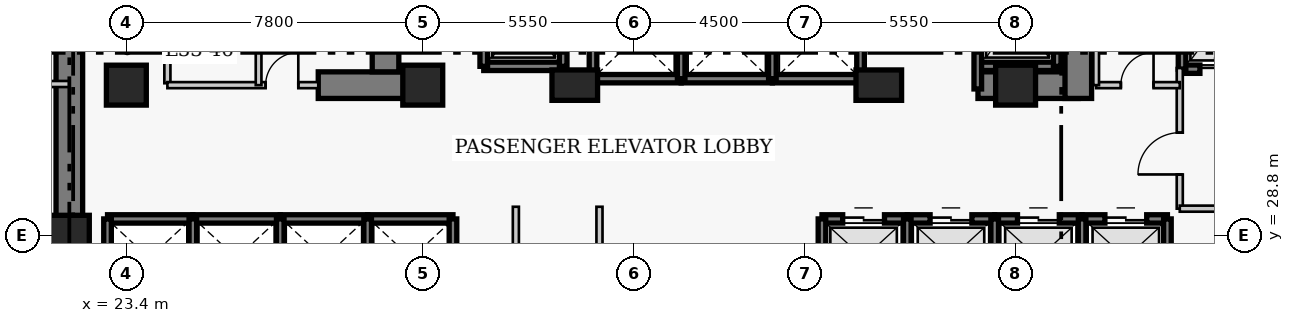
"""IFC4 building model, lengths in metres.
Left out: names, types, materials, properties, quantities, classifications, styles, units other than length and angle.
Written with IfcOpenShell. Run it as: python <this file> out.ifc"""

import sys

from ifc_helpers import new_model, si_unit, direction, frame, frame_2d, origin, origin_2d, place, context, subcontext, project, spatial, rectangle, extrude, element, fill, save


model = new_model("IFC4")
c1 = context("Model", 3, precision=1e-05, world=origin(), true_north=direction((0.0, 1.0)))
c2 = subcontext(c1, "Body", "Model", "MODEL_VIEW")
j1 = project(units=[si_unit("LENGTHUNIT", "METRE"), si_unit("PLANEANGLEUNIT", "RADIAN")], contexts=[c1])
p1 = place(None, origin())
s1 = spatial("IfcSite", under=j1, at=p1, CompositionType="ELEMENT")
p2 = place(p1, origin())
s2 = spatial("IfcBuilding", under=s1, at=p2, CompositionType="ELEMENT")
p3 = place(p2, frame((0.0, 0.0, 134.6)))
s3 = spatial("IfcBuildingStorey", under=s2, at=p3, CompositionType="ELEMENT", Elevation=134.6)
p4 = place(p3, frame((21.9, 27.05, 0.0), z_axis=(0.0, 0.0, 1.0), x_axis=(0.0, 1.0, 0.0)))
e1 = element("IfcWall", 1, at=p4, inside=s3, PredefinedType="SHEAR", context=c2, shape_type="SweptSolid", body=[
    extrude(rectangle(XDim=13.62, YDim=0.7, at=frame_2d((6.81, 0.0))), origin(), (0.0, 0.0, 1.0), 3.8),
])
p5 = place(p3, frame((28.45, 32.75, 0.0), z_axis=(0.0, 0.0, 1.0), x_axis=(1.0, 0.0, 0.0)))
e2 = element("IfcWall", 2, at=p5, inside=s3, PredefinedType="SHEAR", context=c2, shape_type="SweptSolid", body=[
    extrude(rectangle(XDim=2.4, YDim=0.7, at=frame_2d((1.2, 0.0))), origin(), (0.0, 0.0, 1.0), 3.8),
])
p6 = place(p3, frame((45.81, 32.75, 0.0), z_axis=(0.0, 0.0, 1.0), x_axis=(1.0, 0.0, 0.0)))
e3 = element("IfcWall", 3, at=p6, inside=s3, PredefinedType="SHEAR", context=c2, shape_type="SweptSolid", body=[
    extrude(rectangle(XDim=2.64, YDim=0.7, at=frame_2d((1.32, 0.0))), origin(), (0.0, 0.0, 1.0), 3.8),
])
p7 = place(p3, frame((30.22, 33.1, 0.0), z_axis=(0.0, 0.0, 1.0), x_axis=(0.0, 1.0, 0.0)))
e4 = element("IfcWall", 4, at=p7, inside=s3, PredefinedType="SHEAR", context=c2, shape_type="SweptSolid", body=[
    extrude(rectangle(XDim=7.22, YDim=0.7, at=frame_2d((3.61, 0.0))), origin(), (0.0, 0.0, 1.0), 3.8),
])
p8 = place(p3, frame((48.45, 32.4, 0.0), z_axis=(0.0, 0.0, 1.0), x_axis=(0.0, 1.0, 0.0)))
e5 = element("IfcWall", 5, at=p8, inside=s3, PredefinedType="SHEAR", context=c2, shape_type="SweptSolid", body=[
    extrude(rectangle(XDim=7.92, YDim=0.7, at=frame_2d((3.96, 0.0))), origin(), (0.0, 0.0, 1.0), 3.8),
])
p9 = place(p8, frame((5.8, 0.0, 0.0)))
e6 = element("IfcOpeningElement", 6, at=p9, cuts=e5, PredefinedType="OPENING", context=c2, shape_type="SweptSolid", body=[
    extrude(rectangle(XDim=1.1, YDim=2.15, at=frame_2d((0.55, 1.075))), frame((0.0, 0.36, 0.0), z_axis=(0.0, -1.0, 0.0), x_axis=(1.0, 0.0, 0.0)), (0.0, 0.0, 1.0), 0.72),
])
for number, where, z_axis, x_axis in (
    (7, (21.9, 28.8, 0.0), (0.0, 0.0, 1.0), (1.0, 0.0, 0.0)),
    (8, (23.4, 32.75, 0.0), (0.0, 0.0, 1.0), (1.0, 0.0, 0.0)),
    (9, (31.2, 32.75, 0.0), (0.0, 0.0, 1.0), (1.0, 0.0, 0.0)),
):
    element("IfcColumn", number, at=place(p3, frame(where, z_axis=z_axis, x_axis=x_axis)), inside=s3, PredefinedType="COLUMN", context=c2, shape_type="SweptSolid", body=[
        extrude(rectangle(XDim=1.05, YDim=1.05, at=origin_2d()), origin(), (0.0, 0.0, 1.0), 3.8),
    ])
for number, where, z_axis, x_axis in (
    (10, (35.2, 32.75, 0.0), (0.0, 0.0, 1.0), (1.0, 0.0, 0.0)),
    (11, (43.2, 32.75, 0.0), (0.0, 0.0, 1.0), (1.0, 0.0, 0.0)),
):
    element("IfcColumn", number, at=place(p3, frame(where, z_axis=z_axis, x_axis=x_axis)), inside=s3, PredefinedType="COLUMN", context=c2, shape_type="SweptSolid", body=[
        extrude(rectangle(XDim=1.2, YDim=0.8, at=origin_2d()), origin(), (0.0, 0.0, 1.0), 3.8),
    ])
p10 = place(p3, frame((46.8, 32.75, 0.0), z_axis=(0.0, 0.0, 1.0), x_axis=(1.0, 0.0, 0.0)))
e12 = element("IfcColumn", 12, at=p10, inside=s3, PredefinedType="COLUMN", context=c2, shape_type="SweptSolid", body=[
    extrude(rectangle(XDim=1.05, YDim=1.05, at=origin_2d()), origin(), (0.0, 0.0, 1.0), 3.8),
])
p11 = place(p3, frame((22.905, 29.23, 0.0), z_axis=(0.0, 0.0, 1.0), x_axis=(1.0, 0.0, 0.0)))
e13 = element("IfcWall", 13, at=p11, inside=s3, PredefinedType="SHEAR", context=c2, shape_type="SweptSolid", body=[
    extrude(rectangle(XDim=2.245, YDim=0.22, at=frame_2d((1.123, 0.0))), origin(), (0.0, 0.0, 1.0), 3.8),
])
p12 = place(p3, frame((22.905, 27.17, 0.0), z_axis=(0.0, 0.0, 1.0), x_axis=(0.0, 1.0, 0.0)))
e14 = element("IfcWall", 14, at=p12, inside=s3, PredefinedType="SHEAR", context=c2, shape_type="SweptSolid", body=[
    extrude(rectangle(XDim=2.06, YDim=0.2, at=frame_2d((1.03, 0.0))), origin(), (0.0, 0.0, 1.0), 3.8),
])
p13 = place(p3, frame((25.15, 29.23, 0.0), z_axis=(0.0, 0.0, 1.0), x_axis=(1.0, 0.0, 0.0)))
e15 = element("IfcWall", 15, at=p13, inside=s3, PredefinedType="SHEAR", context=c2, shape_type="SweptSolid", body=[
    extrude(rectangle(XDim=2.3, YDim=0.22, at=frame_2d((1.15, 0.0))), origin(), (0.0, 0.0, 1.0), 3.8),
])
p14 = place(p3, frame((25.15, 27.17, 0.0), z_axis=(0.0, 0.0, 1.0), x_axis=(0.0, 1.0, 0.0)))
e16 = element("IfcWall", 16, at=p14, inside=s3, PredefinedType="SHEAR", context=c2, shape_type="SweptSolid", body=[
    extrude(rectangle(XDim=2.06, YDim=0.2, at=frame_2d((1.03, 0.0))), origin(), (0.0, 0.0, 1.0), 3.8),
])
p15 = place(p3, frame((27.45, 29.23, 0.0), z_axis=(0.0, 0.0, 1.0), x_axis=(1.0, 0.0, 0.0)))
e17 = element("IfcWall", 17, at=p15, inside=s3, PredefinedType="SHEAR", context=c2, shape_type="SweptSolid", body=[
    extrude(rectangle(XDim=2.3, YDim=0.22, at=frame_2d((1.15, 0.0))), origin(), (0.0, 0.0, 1.0), 3.8),
])
p16 = place(p3, frame((27.45, 27.17, 0.0), z_axis=(0.0, 0.0, 1.0), x_axis=(0.0, 1.0, 0.0)))
e18 = element("IfcWall", 18, at=p16, inside=s3, PredefinedType="SHEAR", context=c2, shape_type="SweptSolid", body=[
    extrude(rectangle(XDim=2.06, YDim=0.2, at=frame_2d((1.03, 0.0))), origin(), (0.0, 0.0, 1.0), 3.8),
])
p17 = place(p3, frame((29.75, 29.23, 0.0), z_axis=(0.0, 0.0, 1.0), x_axis=(1.0, 0.0, 0.0)))
e19 = element("IfcWall", 19, at=p17, inside=s3, PredefinedType="SHEAR", context=c2, shape_type="SweptSolid", body=[
    extrude(rectangle(XDim=2.245, YDim=0.22, at=frame_2d((1.123, 0.0))), origin(), (0.0, 0.0, 1.0), 3.8),
])
for number, where, z_axis, x_axis in (
    (20, (29.75, 27.17, 0.0), (0.0, 0.0, 1.0), (0.0, 1.0, 0.0)),
    (21, (31.995, 27.17, 0.0), (0.0, 0.0, 1.0), (0.0, 1.0, 0.0)),
):
    element("IfcWall", number, at=place(p3, frame(where, z_axis=z_axis, x_axis=x_axis)), inside=s3, PredefinedType="SHEAR", context=c2, shape_type="SweptSolid", body=[
        extrude(rectangle(XDim=2.06, YDim=0.2, at=frame_2d((1.03, 0.0))), origin(), (0.0, 0.0, 1.0), 3.8),
    ])
p18 = place(p3, frame((41.705, 29.23, 0.0), z_axis=(0.0, 0.0, 1.0), x_axis=(1.0, 0.0, 0.0)))
e22 = element("IfcWall", 22, at=p18, inside=s3, PredefinedType="SHEAR", context=c2, shape_type="SweptSolid", body=[
    extrude(rectangle(XDim=2.245, YDim=0.22, at=frame_2d((1.123, 0.0))), origin(), (0.0, 0.0, 1.0), 3.8),
])
p19 = place(p18, frame((0.545, 0.0, 0.0)))
e23 = element("IfcOpeningElement", 23, at=p19, cuts=e22, PredefinedType="OPENING", context=c2, shape_type="SweptSolid", body=[
    extrude(rectangle(XDim=1.1, YDim=2.15, at=frame_2d((0.55, 1.075))), frame((0.0, 0.12, 0.0), z_axis=(0.0, -1.0, 0.0), x_axis=(1.0, 0.0, 0.0)), (0.0, 0.0, 1.0), 0.24),
])
p20 = place(p3, frame((41.705, 27.17, 0.0), z_axis=(0.0, 0.0, 1.0), x_axis=(0.0, 1.0, 0.0)))
e24 = element("IfcWall", 24, at=p20, inside=s3, PredefinedType="SHEAR", context=c2, shape_type="SweptSolid", body=[
    extrude(rectangle(XDim=2.06, YDim=0.2, at=frame_2d((1.03, 0.0))), origin(), (0.0, 0.0, 1.0), 3.8),
])
p21 = place(p3, frame((43.95, 29.23, 0.0), z_axis=(0.0, 0.0, 1.0), x_axis=(1.0, 0.0, 0.0)))
e25 = element("IfcWall", 25, at=p21, inside=s3, PredefinedType="SHEAR", context=c2, shape_type="SweptSolid", body=[
    extrude(rectangle(XDim=2.3, YDim=0.22, at=frame_2d((1.15, 0.0))), origin(), (0.0, 0.0, 1.0), 3.8),
])
p22 = place(p21, frame((0.6, 0.0, 0.0)))
e26 = element("IfcOpeningElement", 26, at=p22, cuts=e25, PredefinedType="OPENING", context=c2, shape_type="SweptSolid", body=[
    extrude(rectangle(XDim=1.1, YDim=2.15, at=frame_2d((0.55, 1.075))), frame((0.0, 0.12, 0.0), z_axis=(0.0, -1.0, 0.0), x_axis=(1.0, 0.0, 0.0)), (0.0, 0.0, 1.0), 0.24),
])
p23 = place(p3, frame((43.95, 27.17, 0.0), z_axis=(0.0, 0.0, 1.0), x_axis=(0.0, 1.0, 0.0)))
e27 = element("IfcWall", 27, at=p23, inside=s3, PredefinedType="SHEAR", context=c2, shape_type="SweptSolid", body=[
    extrude(rectangle(XDim=2.06, YDim=0.2, at=frame_2d((1.03, 0.0))), origin(), (0.0, 0.0, 1.0), 3.8),
])
p24 = place(p3, frame((46.25, 29.23, 0.0), z_axis=(0.0, 0.0, 1.0), x_axis=(1.0, 0.0, 0.0)))
e28 = element("IfcWall", 28, at=p24, inside=s3, PredefinedType="SHEAR", context=c2, shape_type="SweptSolid", body=[
    extrude(rectangle(XDim=2.3, YDim=0.22, at=frame_2d((1.15, 0.0))), origin(), (0.0, 0.0, 1.0), 3.8),
])
p25 = place(p24, frame((0.6, 0.0, 0.0)))
e29 = element("IfcOpeningElement", 29, at=p25, cuts=e28, PredefinedType="OPENING", context=c2, shape_type="SweptSolid", body=[
    extrude(rectangle(XDim=1.1, YDim=2.15, at=frame_2d((0.55, 1.075))), frame((0.0, 0.12, 0.0), z_axis=(0.0, -1.0, 0.0), x_axis=(1.0, 0.0, 0.0)), (0.0, 0.0, 1.0), 0.24),
])
p26 = place(p3, frame((46.25, 27.17, 0.0), z_axis=(0.0, 0.0, 1.0), x_axis=(0.0, 1.0, 0.0)))
e30 = element("IfcWall", 30, at=p26, inside=s3, PredefinedType="SHEAR", context=c2, shape_type="SweptSolid", body=[
    extrude(rectangle(XDim=2.06, YDim=0.2, at=frame_2d((1.03, 0.0))), origin(), (0.0, 0.0, 1.0), 3.8),
])
p27 = place(p3, frame((48.55, 29.23, 0.0), z_axis=(0.0, 0.0, 1.0), x_axis=(1.0, 0.0, 0.0)))
e31 = element("IfcWall", 31, at=p27, inside=s3, PredefinedType="SHEAR", context=c2, shape_type="SweptSolid", body=[
    extrude(rectangle(XDim=2.245, YDim=0.22, at=frame_2d((1.123, 0.0))), origin(), (0.0, 0.0, 1.0), 3.8),
])
p28 = place(p27, frame((0.6, 0.0, 0.0)))
e32 = element("IfcOpeningElement", 32, at=p28, cuts=e31, PredefinedType="OPENING", context=c2, shape_type="SweptSolid", body=[
    extrude(rectangle(XDim=1.1, YDim=2.15, at=frame_2d((0.55, 1.075))), frame((0.0, 0.12, 0.0), z_axis=(0.0, -1.0, 0.0), x_axis=(1.0, 0.0, 0.0)), (0.0, 0.0, 1.0), 0.24),
])
for number, where, z_axis, x_axis in (
    (33, (48.55, 27.17, 0.0), (0.0, 0.0, 1.0), (0.0, 1.0, 0.0)),
    (34, (50.795, 27.17, 0.0), (0.0, 0.0, 1.0), (0.0, 1.0, 0.0)),
):
    element("IfcWall", number, at=place(p3, frame(where, z_axis=z_axis, x_axis=x_axis)), inside=s3, PredefinedType="SHEAR", context=c2, shape_type="SweptSolid", body=[
        extrude(rectangle(XDim=2.06, YDim=0.2, at=frame_2d((1.03, 0.0))), origin(), (0.0, 0.0, 1.0), 3.8),
    ])
p29 = place(p3, frame((35.68, 32.92, 0.0), z_axis=(0.0, 0.0, 1.0), x_axis=(1.0, 0.0, 0.0)))
e35 = element("IfcWall", 35, at=p29, inside=s3, PredefinedType="SHEAR", context=c2, shape_type="SweptSolid", body=[
    extrude(rectangle(XDim=2.32, YDim=0.22, at=frame_2d((1.16, 0.0))), origin(), (0.0, 0.0, 1.0), 3.8),
])
p30 = place(p3, frame((35.68, 32.92, 0.0), z_axis=(0.0, 0.0, 1.0), x_axis=(0.0, 1.0, 0.0)))
e36 = element("IfcWall", 36, at=p30, inside=s3, PredefinedType="SHEAR", context=c2, shape_type="SweptSolid", body=[
    extrude(rectangle(XDim=2.16, YDim=0.2, at=frame_2d((1.08, 0.0))), origin(), (0.0, 0.0, 1.0), 3.8),
])
p31 = place(p3, frame((38.0, 32.92, 0.0), z_axis=(0.0, 0.0, 1.0), x_axis=(1.0, 0.0, 0.0)))
e37 = element("IfcWall", 37, at=p31, inside=s3, PredefinedType="SHEAR", context=c2, shape_type="SweptSolid", body=[
    extrude(rectangle(XDim=2.4, YDim=0.22, at=frame_2d((1.2, 0.0))), origin(), (0.0, 0.0, 1.0), 3.8),
])
p32 = place(p3, frame((38.0, 32.92, 0.0), z_axis=(0.0, 0.0, 1.0), x_axis=(0.0, 1.0, 0.0)))
e38 = element("IfcWall", 38, at=p32, inside=s3, PredefinedType="SHEAR", context=c2, shape_type="SweptSolid", body=[
    extrude(rectangle(XDim=2.16, YDim=0.2, at=frame_2d((1.08, 0.0))), origin(), (0.0, 0.0, 1.0), 3.8),
])
p33 = place(p3, frame((40.4, 32.92, 0.0), z_axis=(0.0, 0.0, 1.0), x_axis=(1.0, 0.0, 0.0)))
e39 = element("IfcWall", 39, at=p33, inside=s3, PredefinedType="SHEAR", context=c2, shape_type="SweptSolid", body=[
    extrude(rectangle(XDim=2.32, YDim=0.22, at=frame_2d((1.16, 0.0))), origin(), (0.0, 0.0, 1.0), 3.8),
])
for number, where, z_axis, x_axis in (
    (40, (40.4, 32.92, 0.0), (0.0, 0.0, 1.0), (0.0, 1.0, 0.0)),
    (41, (42.72, 32.92, 0.0), (0.0, 0.0, 1.0), (0.0, 1.0, 0.0)),
):
    element("IfcWall", number, at=place(p3, frame(where, z_axis=z_axis, x_axis=x_axis)), inside=s3, PredefinedType="SHEAR", context=c2, shape_type="SweptSolid", body=[
        extrude(rectangle(XDim=2.16, YDim=0.2, at=frame_2d((1.08, 0.0))), origin(), (0.0, 0.0, 1.0), 3.8),
    ])
p34 = place(p3, frame((51.18, 33.17, 0.0), z_axis=(0.0, 0.0, 1.0), x_axis=(1.0, 0.0, 0.0)))
e42 = element("IfcWall", 42, at=p34, inside=s3, PredefinedType="SHEAR", context=c2, shape_type="SweptSolid", body=[
    extrude(rectangle(XDim=2.42, YDim=0.22, at=frame_2d((1.21, 0.0))), origin(), (0.0, 0.0, 1.0), 3.8),
])
p35 = place(p34, frame((0.47, 0.0, 0.0)))
e43 = element("IfcOpeningElement", 43, at=p35, cuts=e42, PredefinedType="OPENING", context=c2, shape_type="SweptSolid", body=[
    extrude(rectangle(XDim=1.3, YDim=2.15, at=frame_2d((0.65, 1.075))), frame((0.0, 0.12, 0.0), z_axis=(0.0, -1.0, 0.0), x_axis=(1.0, 0.0, 0.0)), (0.0, 0.0, 1.0), 0.24),
])
p36 = place(p3, frame((51.18, 33.17, 0.0), z_axis=(0.0, 0.0, 1.0), x_axis=(0.0, 1.0, 0.0)))
e44 = element("IfcWall", 44, at=p36, inside=s3, PredefinedType="SHEAR", context=c2, shape_type="SweptSolid", body=[
    extrude(rectangle(XDim=2.86, YDim=0.2, at=frame_2d((1.43, 0.0))), origin(), (0.0, 0.0, 1.0), 3.8),
])
p37 = place(p3, frame((32.805, 33.245, 0.0), z_axis=(0.0, 0.0, 1.0), x_axis=(1.0, 0.0, 0.0)))
e45 = element("IfcWall", 45, at=p37, inside=s3, PredefinedType="SHEAR", context=c2, shape_type="SweptSolid", body=[
    extrude(rectangle(XDim=2.09, YDim=0.22, at=frame_2d((1.045, 0.0))), origin(), (0.0, 0.0, 1.0), 3.8),
])
for number, where, z_axis, x_axis in (
    (46, (32.805, 33.245, 0.0), (0.0, 0.0, 1.0), (0.0, 1.0, 0.0)),
    (47, (34.895, 33.245, 0.0), (0.0, 0.0, 1.0), (0.0, 1.0, 0.0)),
):
    element("IfcWall", number, at=place(p3, frame(where, z_axis=z_axis, x_axis=x_axis)), inside=s3, PredefinedType="SHEAR", context=c2, shape_type="SweptSolid", body=[
        extrude(rectangle(XDim=2.91, YDim=0.2, at=frame_2d((1.455, 0.0))), origin(), (0.0, 0.0, 1.0), 3.8),
    ])
p38 = place(p3, frame((45.805, 33.245, 0.0), z_axis=(0.0, 0.0, 1.0), x_axis=(1.0, 0.0, 0.0)))
e48 = element("IfcWall", 48, at=p38, inside=s3, PredefinedType="SHEAR", context=c2, shape_type="SweptSolid", body=[
    extrude(rectangle(XDim=2.09, YDim=0.22, at=frame_2d((1.045, 0.0))), origin(), (0.0, 0.0, 1.0), 3.8),
])
p39 = place(p3, frame((45.805, 32.65, 0.0), z_axis=(0.0, 0.0, 1.0), x_axis=(0.0, 1.0, 0.0)))
e49 = element("IfcWall", 49, at=p39, inside=s3, PredefinedType="SHEAR", context=c2, shape_type="SweptSolid", body=[
    extrude(rectangle(XDim=3.505, YDim=0.2, at=frame_2d((1.752, 0.0))), origin(), (0.0, 0.0, 1.0), 3.8),
])
p40 = place(p3, frame((47.895, 33.245, 0.0), z_axis=(0.0, 0.0, 1.0), x_axis=(0.0, 1.0, 0.0)))
e50 = element("IfcWall", 50, at=p40, inside=s3, PredefinedType="SHEAR", context=c2, shape_type="SweptSolid", body=[
    extrude(rectangle(XDim=2.91, YDim=0.2, at=frame_2d((1.455, 0.0))), origin(), (0.0, 0.0, 1.0), 3.8),
])
p41 = place(p3, frame((24.48, 32.8, 0.0), z_axis=(0.0, 0.0, 1.0), x_axis=(0.0, 1.0, 0.0)))
e51 = element("IfcWall", 51, at=p41, inside=s3, PredefinedType="PARTITIONING", context=c2, shape_type="SweptSolid", body=[
    extrude(rectangle(XDim=3.57, YDim=0.16, at=frame_2d((1.785, 0.0))), origin(), (0.0, 0.0, 1.0), 3.55),
])
p42 = place(p41, frame((1.604, 0.0, 0.0)))
e52 = element("IfcOpeningElement", 52, at=p42, cuts=e51, PredefinedType="OPENING", context=c2, shape_type="SweptSolid", body=[
    extrude(rectangle(XDim=0.9, YDim=2.1, at=frame_2d((0.45, 1.05))), frame((0.0, 0.09, 0.0), z_axis=(0.0, -1.0, 0.0), x_axis=(1.0, 0.0, 0.0)), (0.0, 0.0, 1.0), 0.18),
])
p43 = place(p3, frame((51.12, 29.5, 0.0), z_axis=(0.0, 0.0, 1.0), x_axis=(0.0, 1.0, 0.0)))
e53 = element("IfcWall", 53, at=p43, inside=s3, PredefinedType="PARTITIONING", context=c2, shape_type="SweptSolid", body=[
    extrude(rectangle(XDim=3.7, YDim=0.16, at=frame_2d((1.85, 0.0))), origin(), (0.0, 0.0, 1.0), 3.55),
])
p44 = place(p43, frame((0.9, 0.0, 0.0)))
e54 = element("IfcOpeningElement", 54, at=p44, cuts=e53, PredefinedType="OPENING", context=c2, shape_type="SweptSolid", body=[
    extrude(rectangle(XDim=1.1, YDim=2.15, at=frame_2d((0.55, 1.075))), frame((0.0, 0.09, 0.0), z_axis=(0.0, -1.0, 0.0), x_axis=(1.0, 0.0, 0.0)), (0.0, 0.0, 1.0), 0.18),
])
p45 = place(p3, frame((51.12, 29.5, 0.0), z_axis=(0.0, 0.0, 1.0), x_axis=(1.0, 0.0, 0.0)))
e55 = element("IfcWall", 55, at=p45, inside=s3, PredefinedType="PARTITIONING", context=c2, shape_type="SweptSolid", body=[
    extrude(rectangle(XDim=5.63, YDim=0.16, at=frame_2d((2.815, 0.0))), origin(), (0.0, 0.0, 1.0), 3.55),
])
p46 = place(p3, frame((24.48, 32.75, 0.0), z_axis=(0.0, 0.0, 1.0), x_axis=(1.0, 0.0, 0.0)))
e56 = element("IfcWall", 56, at=p46, inside=s3, PredefinedType="PARTITIONING", context=c2, shape_type="SweptSolid", body=[
    extrude(rectangle(XDim=3.97, YDim=0.16, at=frame_2d((1.985, 0.0))), origin(), (0.0, 0.0, 1.0), 3.55),
])
p47 = place(p46, frame((2.585, 0.0, 0.0)))
e57 = element("IfcOpeningElement", 57, at=p47, cuts=e56, PredefinedType="OPENING", context=c2, shape_type="SweptSolid", body=[
    extrude(rectangle(XDim=0.86, YDim=2.05, at=frame_2d((0.43, 1.025))), frame((0.0, 0.09, 0.0), z_axis=(0.0, -1.0, 0.0), x_axis=(1.0, 0.0, 0.0)), (0.0, 0.0, 1.0), 0.18),
])
p48 = place(p3, frame((48.92, 32.75, 0.0), z_axis=(0.0, 0.0, 1.0), x_axis=(1.0, 0.0, 0.0)))
e58 = element("IfcWall", 58, at=p48, inside=s3, PredefinedType="PARTITIONING", context=c2, shape_type="SweptSolid", body=[
    extrude(rectangle(XDim=2.2, YDim=0.16, at=frame_2d((1.1, 0.0))), origin(), (0.0, 0.0, 1.0), 3.55),
])
p49 = place(p48, frame((0.65, 0.0, 0.0)))
e59 = element("IfcOpeningElement", 59, at=p49, cuts=e58, PredefinedType="OPENING", context=c2, shape_type="SweptSolid", body=[
    extrude(rectangle(XDim=0.86, YDim=2.05, at=frame_2d((0.43, 1.025))), frame((0.0, 0.09, 0.0), z_axis=(0.0, -1.0, 0.0), x_axis=(1.0, 0.0, 0.0)), (0.0, 0.0, 1.0), 0.18),
])
for number, where, z_axis, x_axis in (
    (60, (48.92, 32.75, 0.0), (0.0, 0.0, 1.0), (0.0, 1.0, 0.0)),
    (61, (26.88, 32.75, 0.0), (0.0, 0.0, 1.0), (0.0, 1.0, 0.0)),
):
    element("IfcWall", number, at=place(p3, frame(where, z_axis=z_axis, x_axis=x_axis)), inside=s3, PredefinedType="PARTITIONING", context=c2, shape_type="SweptSolid", body=[
        extrude(rectangle(XDim=3.62, YDim=0.15, at=frame_2d((1.81, 0.0))), origin(), (0.0, 0.0, 1.0), 3.55),
    ])
for number, where, z_axis, x_axis in (
    (62, (33.65, 16.66, 0.0), (0.0, 0.0, 1.0), (0.0, 1.0, 0.0)),
    (63, (35.85, 16.66, 0.0), (0.0, 0.0, 1.0), (0.0, 1.0, 0.0)),
):
    element("IfcWall", number, at=place(p3, frame(where, z_axis=z_axis, x_axis=x_axis)), inside=s3, PredefinedType="PARTITIONING", context=c2, shape_type="SweptSolid", body=[
        extrude(rectangle(XDim=12.89, YDim=0.16, at=frame_2d((6.445, 0.0))), origin(), (0.0, 0.0, 1.0), 3.55),
    ])
p50 = place(p3, frame((20.46, 32.78, 0.0), z_axis=(0.0, 0.0, 1.0), x_axis=(1.0, 0.0, 0.0)))
e64 = element("IfcWall", 64, at=p50, inside=s3, PredefinedType="PARTITIONING", context=c2, shape_type="SweptSolid", body=[
    extrude(rectangle(XDim=1.44, YDim=0.16, at=frame_2d((0.72, 0.0))), origin(), (0.0, 0.0, 1.0), 3.55),
])
p51 = place(p19, origin())
e65 = element("IfcDoor", 65, at=p51, inside=s3, OperationType="DOUBLE_DOOR_SLIDING", PredefinedType="DOOR", context=c2, shape_type="SweptSolid", body=[
    extrude(rectangle(XDim=1.1, YDim=2.15, at=frame_2d((0.55, 1.075))), frame((0.0, 0.025, 0.0), z_axis=(0.0, -1.0, 0.0), x_axis=(1.0, 0.0, 0.0)), (0.0, 0.0, 1.0), 0.05),
])
fill(e23, e65)
p52 = place(p22, origin())
e66 = element("IfcDoor", 66, at=p52, inside=s3, OperationType="DOUBLE_DOOR_SLIDING", PredefinedType="DOOR", context=c2, shape_type="SweptSolid", body=[
    extrude(rectangle(XDim=1.1, YDim=2.15, at=frame_2d((0.55, 1.075))), frame((0.0, 0.025, 0.0), z_axis=(0.0, -1.0, 0.0), x_axis=(1.0, 0.0, 0.0)), (0.0, 0.0, 1.0), 0.05),
])
fill(e26, e66)
p53 = place(p25, origin())
e67 = element("IfcDoor", 67, at=p53, inside=s3, OperationType="DOUBLE_DOOR_SLIDING", PredefinedType="DOOR", context=c2, shape_type="SweptSolid", body=[
    extrude(rectangle(XDim=1.1, YDim=2.15, at=frame_2d((0.55, 1.075))), frame((0.0, 0.025, 0.0), z_axis=(0.0, -1.0, 0.0), x_axis=(1.0, 0.0, 0.0)), (0.0, 0.0, 1.0), 0.05),
])
fill(e29, e67)
p54 = place(p28, origin())
e68 = element("IfcDoor", 68, at=p54, inside=s3, OperationType="DOUBLE_DOOR_SLIDING", PredefinedType="DOOR", context=c2, shape_type="SweptSolid", body=[
    extrude(rectangle(XDim=1.1, YDim=2.15, at=frame_2d((0.55, 1.075))), frame((0.0, 0.025, 0.0), z_axis=(0.0, -1.0, 0.0), x_axis=(1.0, 0.0, 0.0)), (0.0, 0.0, 1.0), 0.05),
])
fill(e32, e68)
p55 = place(p35, origin())
e69 = element("IfcDoor", 69, at=p55, inside=s3, OperationType="DOUBLE_DOOR_SLIDING", PredefinedType="DOOR", context=c2, shape_type="SweptSolid", body=[
    extrude(rectangle(XDim=1.3, YDim=2.15, at=frame_2d((0.65, 1.075))), frame((0.0, 0.025, 0.0), z_axis=(0.0, -1.0, 0.0), x_axis=(1.0, 0.0, 0.0)), (0.0, 0.0, 1.0), 0.05),
])
fill(e43, e69)
p56 = place(p44, origin())
e70 = element("IfcDoor", 70, at=p56, inside=s3, OperationType="SINGLE_SWING_LEFT", PredefinedType="DOOR", context=c2, shape_type="SweptSolid", body=[
    extrude(rectangle(XDim=1.1, YDim=2.15, at=frame_2d((0.55, 1.075))), frame((0.0, 0.025, 0.0), z_axis=(0.0, -1.0, 0.0), x_axis=(1.0, 0.0, 0.0)), (0.0, 0.0, 1.0), 0.05),
])
fill(e54, e70)
p57 = place(p47, origin())
e71 = element("IfcDoor", 71, at=p57, inside=s3, OperationType="SINGLE_SWING_RIGHT", PredefinedType="DOOR", context=c2, shape_type="SweptSolid", body=[
    extrude(rectangle(XDim=0.86, YDim=2.05, at=frame_2d((0.43, 1.025))), frame((0.0, 0.025, 0.0), z_axis=(0.0, -1.0, 0.0), x_axis=(1.0, 0.0, 0.0)), (0.0, 0.0, 1.0), 0.05),
])
fill(e57, e71)
p58 = place(p49, origin())
e72 = element("IfcDoor", 72, at=p58, inside=s3, OperationType="SINGLE_SWING_RIGHT", PredefinedType="DOOR", context=c2, shape_type="SweptSolid", body=[
    extrude(rectangle(XDim=0.86, YDim=2.05, at=frame_2d((0.43, 1.025))), frame((0.0, 0.025, 0.0), z_axis=(0.0, -1.0, 0.0), x_axis=(1.0, 0.0, 0.0)), (0.0, 0.0, 1.0), 0.05),
])
fill(e59, e72)
save(model, sys.argv[1])
